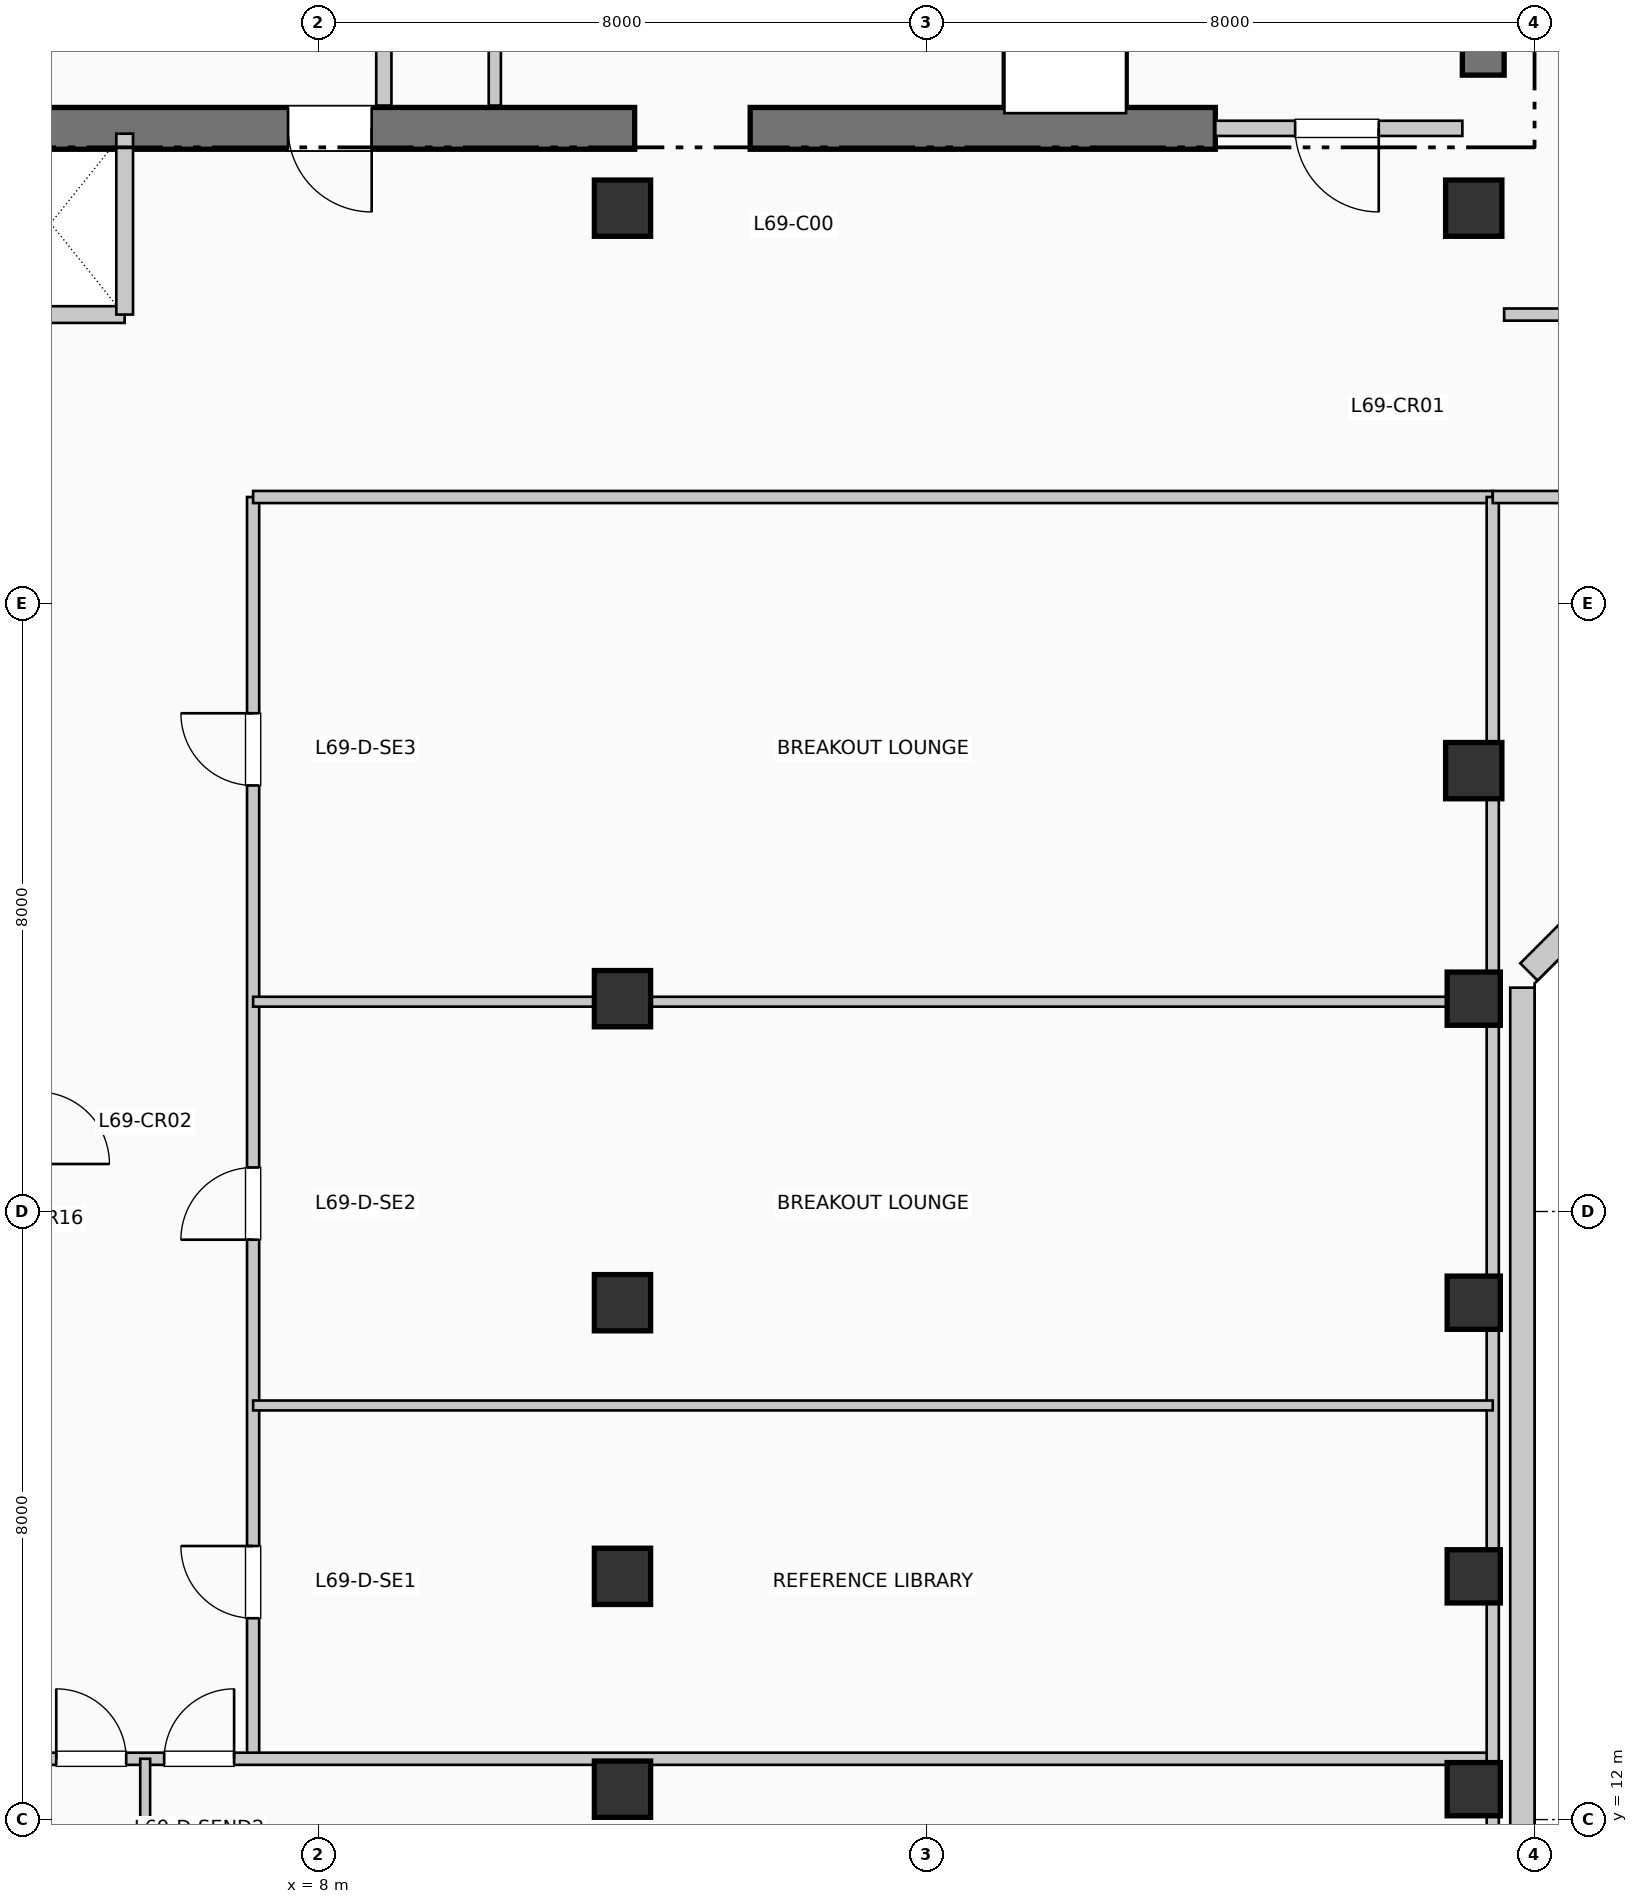
"""IFC4 building model, lengths in metres.
Left out: names, types, materials, properties, quantities, classifications, styles, units other than length and angle.
Written with IfcOpenShell. Run it as: python <this file> out.ifc"""

import sys

from ifc_helpers import new_model, si_unit, direction, frame, frame_2d, origin, origin_2d, place, context, subcontext, project, spatial, rectangle, extrude, element, fill, save


model = new_model("IFC4")
c1 = context("Model", 3, precision=1e-05, world=origin(), true_north=direction((0.0, 1.0)))
c2 = subcontext(c1, "Body", "Model", "MODEL_VIEW")
j1 = project(units=[si_unit("LENGTHUNIT", "METRE"), si_unit("PLANEANGLEUNIT", "RADIAN")], contexts=[c1])
p1 = place(None, origin())
s1 = spatial("IfcSite", under=j1, at=p1, CompositionType="ELEMENT")
p2 = place(p1, origin())
s2 = spatial("IfcBuilding", under=s1, at=p2, CompositionType="ELEMENT")
p3 = place(p2, frame((0.0, 0.0, 284.13)))
s3 = spatial("IfcBuildingStorey", under=s2, at=p3, CompositionType="ELEMENT", Elevation=284.13)
p4 = place(p3, frame((23.325, 34.95, 0.0), z_axis=(0.0, 0.0, 1.0), x_axis=(0.0, 1.0, 0.0)))
e1 = element("IfcWall", 1, at=p4, inside=s3, PredefinedType="SHEAR", context=c2, shape_type="SweptSolid", body=[
    extrude(rectangle(XDim=10.64, YDim=0.55, at=frame_2d((5.32, 0.0))), origin(), (0.0, 0.0, 1.0), 3.96),
])
p5 = place(p3, frame((1.45, 34.25, 0.0), z_axis=(0.0, 0.0, 1.0), x_axis=(1.0, 0.0, 0.0)))
e2 = element("IfcWall", 2, at=p5, inside=s3, PredefinedType="SHEAR", context=c2, shape_type="SweptSolid", body=[
    extrude(rectangle(XDim=10.71, YDim=0.55, at=frame_2d((5.355, 0.0))), origin(), (0.0, 0.0, 1.0), 3.96),
])
p6 = place(p5, frame((7.25, 0.0, 0.0), z_axis=(0.0, 0.0, 1.0), x_axis=(-1.0, 0.0, 0.0)))
e3 = element("IfcOpeningElement", 3, at=p6, cuts=e2, PredefinedType="OPENING", context=c2, shape_type="SweptSolid", body=[
    extrude(rectangle(XDim=1.1, YDim=2.15, at=frame_2d((0.55, 1.075))), frame((0.0, 0.285, 0.0), z_axis=(0.0, -1.0, 0.0), x_axis=(1.0, 0.0, 0.0)), (0.0, 0.0, 1.0), 0.57),
])
p7 = place(p3, frame((13.68, 34.25, 0.0), z_axis=(0.0, 0.0, 1.0), x_axis=(1.0, 0.0, 0.0)))
e4 = element("IfcWall", 4, at=p7, inside=s3, PredefinedType="SHEAR", context=c2, shape_type="SweptSolid", body=[
    extrude(rectangle(XDim=6.12, YDim=0.55, at=frame_2d((3.06, 0.0))), origin(), (0.0, 0.0, 1.0), 3.96),
])
for number, where, z_axis, x_axis in (
    (5, (12.0, 12.4, 0.0), (0.0, 0.0, 1.0), (1.0, 0.0, 0.0)),
    (6, (12.0, 15.2, 0.0), (0.0, 0.0, 1.0), (1.0, 0.0, 0.0)),
    (7, (12.0, 18.8, 0.0), (0.0, 0.0, 1.0), (1.0, 0.0, 0.0)),
    (8, (12.0, 22.8, 0.0), (0.0, 0.0, 1.0), (1.0, 0.0, 0.0)),
    (9, (12.0, 33.2, 0.0), (0.0, 0.0, 1.0), (1.0, 0.0, 0.0)),
):
    element("IfcColumn", number, at=place(p3, frame(where, z_axis=z_axis, x_axis=x_axis)), inside=s3, PredefinedType="COLUMN", context=c2, shape_type="SweptSolid", body=[
        extrude(rectangle(XDim=0.74, YDim=0.74, at=origin_2d()), origin(), (0.0, 0.0, 1.0), 3.96),
    ])
for number, where, z_axis, x_axis in (
    (10, (23.2, 12.4, 0.0), (0.0, 0.0, 1.0), (1.0, 0.0, 0.0)),
    (11, (23.2, 15.2, 0.0), (0.0, 0.0, 1.0), (1.0, 0.0, 0.0)),
    (12, (23.2, 18.8, 0.0), (0.0, 0.0, 1.0), (1.0, 0.0, 0.0)),
    (13, (23.2, 22.8, 0.0), (0.0, 0.0, 1.0), (1.0, 0.0, 0.0)),
):
    element("IfcColumn", number, at=place(p3, frame(where, z_axis=z_axis, x_axis=x_axis)), inside=s3, PredefinedType="COLUMN", context=c2, shape_type="SweptSolid", body=[
        extrude(rectangle(XDim=0.7, YDim=0.7, at=origin_2d()), origin(), (0.0, 0.0, 1.0), 3.96),
    ])
for number, where, z_axis, x_axis in (
    (14, (23.2, 25.8, 0.0), (0.0, 0.0, 1.0), (1.0, 0.0, 0.0)),
    (15, (23.2, 33.2, 0.0), (0.0, 0.0, 1.0), (1.0, 0.0, 0.0)),
):
    element("IfcColumn", number, at=place(p3, frame(where, z_axis=z_axis, x_axis=x_axis)), inside=s3, PredefinedType="COLUMN", context=c2, shape_type="SweptSolid", body=[
        extrude(rectangle(XDim=0.74, YDim=0.74, at=origin_2d()), origin(), (0.0, 0.0, 1.0), 3.96),
    ])
p8 = place(p3, frame((23.84, 8.855, 0.0), z_axis=(0.0, 0.0, 1.0), x_axis=(0.0, 1.0, 0.0)))
e16 = element("IfcWall", 16, at=p8, inside=s3, PredefinedType="SOLIDWALL", context=c2, shape_type="SweptSolid", body=[
    extrude(rectangle(XDim=14.09, YDim=0.32, at=frame_2d((7.045, 0.0))), origin(), (0.0, 0.0, 1.0), 3.74),
])
p9 = place(p3, frame((23.926, 23.152, 0.0), z_axis=(0.0, 0.0, 1.0), x_axis=(0.707106781187, 0.707106781187, 0.0)))
e17 = element("IfcWall", 17, at=p9, inside=s3, PredefinedType="SOLIDWALL", context=c2, shape_type="SweptSolid", body=[
    extrude(rectangle(XDim=2.718, YDim=0.32, at=frame_2d((1.359, 0.0))), origin(), (0.0, 0.0, 1.0), 3.74),
])
p10 = place(p3, frame((8.86, 34.55, 0.0), z_axis=(0.0, 0.0, 1.0), x_axis=(0.0, 1.0, 0.0)))
e18 = element("IfcWall", 18, at=p10, inside=s3, PredefinedType="PARTITIONING", context=c2, shape_type="SweptSolid", body=[
    extrude(rectangle(XDim=2.5, YDim=0.2, at=frame_2d((1.25, 0.0))), origin(), (0.0, 0.0, 1.0), 3.74),
])
p11 = place(p3, frame((19.8, 34.25, 0.0), z_axis=(0.0, 0.0, 1.0), x_axis=(1.0, 0.0, 0.0)))
e19 = element("IfcWall", 19, at=p11, inside=s3, PredefinedType="PARTITIONING", context=c2, shape_type="SweptSolid", body=[
    extrude(rectangle(XDim=3.25, YDim=0.2, at=frame_2d((1.625, 0.0))), origin(), (0.0, 0.0, 1.0), 3.74),
])
p12 = place(p11, frame((2.15, 0.0, 0.0), z_axis=(0.0, 0.0, 1.0), x_axis=(-1.0, 0.0, 0.0)))
e20 = element("IfcOpeningElement", 20, at=p12, cuts=e19, PredefinedType="OPENING", context=c2, shape_type="SweptSolid", body=[
    extrude(rectangle(XDim=1.1, YDim=2.15, at=frame_2d((0.55, 1.075))), frame((0.0, 0.11, 0.0), z_axis=(0.0, -1.0, 0.0), x_axis=(1.0, 0.0, 0.0)), (0.0, 0.0, 1.0), 0.22),
])
p13 = place(p3, frame((1.55, 31.8, 0.0), z_axis=(0.0, 0.0, 1.0), x_axis=(1.0, 0.0, 0.0)))
e21 = element("IfcWall", 21, at=p13, inside=s3, PredefinedType="PARTITIONING", context=c2, shape_type="SweptSolid", body=[
    extrude(rectangle(XDim=3.9, YDim=0.22, at=frame_2d((1.95, 0.0))), origin(), (0.0, 0.0, 1.0), 3.74),
])
p14 = place(p3, frame((5.45, 31.8, 0.0), z_axis=(0.0, 0.0, 1.0), x_axis=(0.0, 1.0, 0.0)))
e22 = element("IfcWall", 22, at=p14, inside=s3, PredefinedType="PARTITIONING", context=c2, shape_type="SweptSolid", body=[
    extrude(rectangle(XDim=2.38, YDim=0.22, at=frame_2d((1.19, 0.0))), origin(), (0.0, 0.0, 1.0), 3.74),
])
p15 = place(p3, frame((10.32, 34.55, 0.0), z_axis=(0.0, 0.0, 1.0), x_axis=(0.0, 1.0, 0.0)))
e23 = element("IfcWall", 23, at=p15, inside=s3, PredefinedType="PARTITIONING", context=c2, shape_type="SweptSolid", body=[
    extrude(rectangle(XDim=2.15, YDim=0.16, at=frame_2d((1.075, 0.0))), origin(), (0.0, 0.0, 1.0), 3.74),
])
p16 = place(p3, frame((7.14, 12.8, 0.0), z_axis=(0.0, 0.0, 1.0), x_axis=(0.0, 1.0, 0.0)))
e24 = element("IfcWall", 24, at=p16, inside=s3, PredefinedType="PARTITIONING", context=c2, shape_type="SweptSolid", body=[
    extrude(rectangle(XDim=16.6, YDim=0.16, at=frame_2d((8.3, 0.0))), origin(), (0.0, 0.0, 1.0), 3.74),
])
p17 = place(p16, frame((1.849, 0.0, 0.0)))
e25 = element("IfcOpeningElement", 25, at=p17, cuts=e24, PredefinedType="OPENING", context=c2, shape_type="SweptSolid", body=[
    extrude(rectangle(XDim=0.95, YDim=2.15, at=frame_2d((0.475, 1.075))), frame((0.0, 0.09, 0.0), z_axis=(0.0, -1.0, 0.0), x_axis=(1.0, 0.0, 0.0)), (0.0, 0.0, 1.0), 0.18),
])
p18 = place(p16, frame((6.829, 0.0, 0.0)))
e26 = element("IfcOpeningElement", 26, at=p18, cuts=e24, PredefinedType="OPENING", context=c2, shape_type="SweptSolid", body=[
    extrude(rectangle(XDim=0.95, YDim=2.15, at=frame_2d((0.475, 1.075))), frame((0.0, 0.09, 0.0), z_axis=(0.0, -1.0, 0.0), x_axis=(1.0, 0.0, 0.0)), (0.0, 0.0, 1.0), 0.18),
])
p19 = place(p16, frame((12.805, 0.0, 0.0)))
e27 = element("IfcOpeningElement", 27, at=p19, cuts=e24, PredefinedType="OPENING", context=c2, shape_type="SweptSolid", body=[
    extrude(rectangle(XDim=0.95, YDim=2.15, at=frame_2d((0.475, 1.075))), frame((0.0, 0.09, 0.0), z_axis=(0.0, -1.0, 0.0), x_axis=(1.0, 0.0, 0.0)), (0.0, 0.0, 1.0), 0.18),
])
p20 = place(p3, frame((0.19, 12.8, 0.0), z_axis=(0.0, 0.0, 1.0), x_axis=(1.0, 0.0, 0.0)))
e28 = element("IfcWall", 28, at=p20, inside=s3, PredefinedType="PARTITIONING", context=c2, shape_type="SweptSolid", body=[
    extrude(rectangle(XDim=23.26, YDim=0.16, at=frame_2d((11.63, 0.0))), origin(), (0.0, 0.0, 1.0), 3.175),
])
p21 = place(p20, frame((4.36, 0.0, 0.0)))
e29 = element("IfcOpeningElement", 29, at=p21, cuts=e28, PredefinedType="OPENING", context=c2, shape_type="SweptSolid", body=[
    extrude(rectangle(XDim=0.92, YDim=2.1, at=frame_2d((0.46, 1.05))), frame((0.0, 0.09, 0.0), z_axis=(0.0, -1.0, 0.0), x_axis=(1.0, 0.0, 0.0)), (0.0, 0.0, 1.0), 0.18),
])
p22 = place(p20, frame((5.78, 0.0, 0.0)))
e30 = element("IfcOpeningElement", 30, at=p22, cuts=e28, PredefinedType="OPENING", context=c2, shape_type="SweptSolid", body=[
    extrude(rectangle(XDim=0.92, YDim=2.1, at=frame_2d((0.46, 1.05))), frame((0.0, 0.09, 0.0), z_axis=(0.0, -1.0, 0.0), x_axis=(1.0, 0.0, 0.0)), (0.0, 0.0, 1.0), 0.18),
])
p23 = place(p3, frame((7.14, 29.4, 0.0), z_axis=(0.0, 0.0, 1.0), x_axis=(1.0, 0.0, 0.0)))
e31 = element("IfcWall", 31, at=p23, inside=s3, PredefinedType="PARTITIONING", context=c2, shape_type="SweptSolid", body=[
    extrude(rectangle(XDim=16.31, YDim=0.16, at=frame_2d((8.155, 0.0))), origin(), (0.0, 0.0, 1.0), 3.425),
])
p24 = place(p3, frame((23.45, 5.99, 0.0), z_axis=(0.0, 0.0, 1.0), x_axis=(0.0, 1.0, 0.0)))
e32 = element("IfcWall", 32, at=p24, inside=s3, PredefinedType="PARTITIONING", context=c2, shape_type="SweptSolid", body=[
    extrude(rectangle(XDim=23.41, YDim=0.16, at=frame_2d((11.705, 0.0))), origin(), (0.0, 0.0, 1.0), 3.175),
])
p25 = place(p3, frame((5.72, 5.99, 0.0), z_axis=(0.0, 0.0, 1.0), x_axis=(0.0, 1.0, 0.0)))
e33 = element("IfcWall", 33, at=p25, inside=s3, PredefinedType="PARTITIONING", context=c2, shape_type="SweptSolid", body=[
    extrude(rectangle(XDim=6.81, YDim=0.13, at=frame_2d((3.405, 0.0))), origin(), (0.0, 0.0, 1.0), 3.74),
])
p26 = place(p3, frame((7.14, 17.448, 0.0), z_axis=(0.0, 0.0, 1.0), x_axis=(1.0, 0.0, 0.0)))
e34 = element("IfcWall", 34, at=p26, inside=s3, PredefinedType="PARTITIONING", context=c2, shape_type="SweptSolid", body=[
    extrude(rectangle(XDim=16.31, YDim=0.13, at=frame_2d((8.155, 0.0))), origin(), (0.0, 0.0, 1.0), 3.74),
])
p27 = place(p3, frame((7.14, 22.76, 0.0), z_axis=(0.0, 0.0, 1.0), x_axis=(1.0, 0.0, 0.0)))
e35 = element("IfcWall", 35, at=p27, inside=s3, PredefinedType="PARTITIONING", context=c2, shape_type="SweptSolid", body=[
    extrude(rectangle(XDim=16.31, YDim=0.13, at=frame_2d((8.155, 0.0))), origin(), (0.0, 0.0, 1.0), 3.175),
])
p28 = place(p3, frame((23.45, 29.4, 0.0), z_axis=(0.0, 0.0, 1.0), x_axis=(1.0, 0.0, 0.0)))
e36 = element("IfcWall", 36, at=p28, inside=s3, PredefinedType="PARTITIONING", context=c2, shape_type="SweptSolid", body=[
    extrude(rectangle(XDim=20.76, YDim=0.16, at=frame_2d((10.38, 0.0))), origin(), (0.0, 0.0, 1.0), 3.425),
])
p29 = place(p28, frame((2.966, 0.0, 0.0), z_axis=(0.0, 0.0, 1.0), x_axis=(-1.0, 0.0, 0.0)))
e37 = element("IfcOpeningElement", 37, at=p29, cuts=e36, PredefinedType="OPENING", context=c2, shape_type="SweptSolid", body=[
    extrude(rectangle(XDim=0.95, YDim=2.15, at=frame_2d((0.475, 1.075))), frame((0.0, 0.09, 0.0), z_axis=(0.0, -1.0, 0.0), x_axis=(1.0, 0.0, 0.0)), (0.0, 0.0, 1.0), 0.18),
])
p30 = place(p28, frame((8.364, 0.0, 0.0), z_axis=(0.0, 0.0, 1.0), x_axis=(-1.0, 0.0, 0.0)))
e38 = element("IfcOpeningElement", 38, at=p30, cuts=e36, PredefinedType="OPENING", context=c2, shape_type="SweptSolid", body=[
    extrude(rectangle(XDim=0.95, YDim=2.15, at=frame_2d((0.475, 1.075))), frame((0.0, 0.09, 0.0), z_axis=(0.0, -1.0, 0.0), x_axis=(1.0, 0.0, 0.0)), (0.0, 0.0, 1.0), 0.18),
])
p31 = place(p28, frame((14.177, 0.0, 0.0), z_axis=(0.0, 0.0, 1.0), x_axis=(-1.0, 0.0, 0.0)))
e39 = element("IfcOpeningElement", 39, at=p31, cuts=e36, PredefinedType="OPENING", context=c2, shape_type="SweptSolid", body=[
    extrude(rectangle(XDim=0.95, YDim=2.15, at=frame_2d((0.475, 1.075))), frame((0.0, 0.09, 0.0), z_axis=(0.0, -1.0, 0.0), x_axis=(1.0, 0.0, 0.0)), (0.0, 0.0, 1.0), 0.18),
])
p32 = place(p28, frame((19.159, 0.0, 0.0), z_axis=(0.0, 0.0, 1.0), x_axis=(-1.0, 0.0, 0.0)))
e40 = element("IfcOpeningElement", 40, at=p32, cuts=e36, PredefinedType="OPENING", context=c2, shape_type="SweptSolid", body=[
    extrude(rectangle(XDim=0.95, YDim=2.15, at=frame_2d((0.475, 1.075))), frame((0.0, 0.09, 0.0), z_axis=(0.0, -1.0, 0.0), x_axis=(1.0, 0.0, 0.0)), (0.0, 0.0, 1.0), 0.18),
])
p33 = place(p3, frame((23.6, 31.8, 0.0), z_axis=(0.0, 0.0, 1.0), x_axis=(1.0, 0.0, 0.0)))
e41 = element("IfcWall", 41, at=p33, inside=s3, PredefinedType="PARTITIONING", context=c2, shape_type="SweptSolid", body=[
    extrude(rectangle(XDim=20.61, YDim=0.16, at=frame_2d((10.305, 0.0))), origin(), (0.0, 0.0, 1.0), 3.74),
])
p34 = place(p33, frame((4.677, 0.0, 0.0)))
e42 = element("IfcOpeningElement", 42, at=p34, cuts=e41, PredefinedType="OPENING", context=c2, shape_type="SweptSolid", body=[
    extrude(rectangle(XDim=0.95, YDim=2.15, at=frame_2d((0.475, 1.075))), frame((0.0, 0.09, 0.0), z_axis=(0.0, -1.0, 0.0), x_axis=(1.0, 0.0, 0.0)), (0.0, 0.0, 1.0), 0.18),
])
p35 = place(p33, frame((14.982, 0.0, 0.0)))
e43 = element("IfcOpeningElement", 43, at=p35, cuts=e41, PredefinedType="OPENING", context=c2, shape_type="SweptSolid", body=[
    extrude(rectangle(XDim=0.95, YDim=2.15, at=frame_2d((0.475, 1.075))), frame((0.0, 0.09, 0.0), z_axis=(0.0, -1.0, 0.0), x_axis=(1.0, 0.0, 0.0)), (0.0, 0.0, 1.0), 0.18),
])
p36 = place(p6, origin())
e44 = element("IfcDoor", 44, at=p36, inside=s3, OperationType="SINGLE_SWING_RIGHT", PredefinedType="DOOR", context=c2, shape_type="SweptSolid", body=[
    extrude(rectangle(XDim=1.1, YDim=2.15, at=frame_2d((0.55, 1.075))), frame((0.0, 0.025, 0.0), z_axis=(0.0, -1.0, 0.0), x_axis=(1.0, 0.0, 0.0)), (0.0, 0.0, 1.0), 0.05),
])
fill(e3, e44)
p37 = place(p12, origin())
e45 = element("IfcDoor", 45, at=p37, inside=s3, OperationType="SINGLE_SWING_RIGHT", PredefinedType="DOOR", context=c2, shape_type="SweptSolid", body=[
    extrude(rectangle(XDim=1.1, YDim=2.15, at=frame_2d((0.55, 1.075))), frame((0.0, 0.025, 0.0), z_axis=(0.0, -1.0, 0.0), x_axis=(1.0, 0.0, 0.0)), (0.0, 0.0, 1.0), 0.05),
])
fill(e20, e45)
p38 = place(p21, origin())
e46 = element("IfcDoor", 46, at=p38, inside=s3, OperationType="SINGLE_SWING_LEFT", PredefinedType="DOOR", context=c2, shape_type="SweptSolid", body=[
    extrude(rectangle(XDim=0.92, YDim=2.1, at=frame_2d((0.46, 1.05))), frame((0.0, 0.025, 0.0), z_axis=(0.0, -1.0, 0.0), x_axis=(1.0, 0.0, 0.0)), (0.0, 0.0, 1.0), 0.05),
])
fill(e29, e46)
p39 = place(p22, origin())
e47 = element("IfcDoor", 47, at=p39, inside=s3, OperationType="SINGLE_SWING_RIGHT", PredefinedType="DOOR", context=c2, shape_type="SweptSolid", body=[
    extrude(rectangle(XDim=0.92, YDim=2.1, at=frame_2d((0.46, 1.05))), frame((0.0, 0.025, 0.0), z_axis=(0.0, -1.0, 0.0), x_axis=(1.0, 0.0, 0.0)), (0.0, 0.0, 1.0), 0.05),
])
fill(e30, e47)
p40 = place(p17, origin())
e48 = element("IfcDoor", 48, at=p40, inside=s3, OperationType="SINGLE_SWING_RIGHT", PredefinedType="DOOR", context=c2, shape_type="SweptSolid", body=[
    extrude(rectangle(XDim=0.95, YDim=2.15, at=frame_2d((0.475, 1.075))), frame((0.0, 0.025, 0.0), z_axis=(0.0, -1.0, 0.0), x_axis=(1.0, 0.0, 0.0)), (0.0, 0.0, 1.0), 0.05),
])
fill(e25, e48)
p41 = place(p18, origin())
e49 = element("IfcDoor", 49, at=p41, inside=s3, OperationType="SINGLE_SWING_LEFT", PredefinedType="DOOR", context=c2, shape_type="SweptSolid", body=[
    extrude(rectangle(XDim=0.95, YDim=2.15, at=frame_2d((0.475, 1.075))), frame((0.0, 0.025, 0.0), z_axis=(0.0, -1.0, 0.0), x_axis=(1.0, 0.0, 0.0)), (0.0, 0.0, 1.0), 0.05),
])
fill(e26, e49)
p42 = place(p19, origin())
e50 = element("IfcDoor", 50, at=p42, inside=s3, OperationType="SINGLE_SWING_RIGHT", PredefinedType="DOOR", context=c2, shape_type="SweptSolid", body=[
    extrude(rectangle(XDim=0.95, YDim=2.15, at=frame_2d((0.475, 1.075))), frame((0.0, 0.025, 0.0), z_axis=(0.0, -1.0, 0.0), x_axis=(1.0, 0.0, 0.0)), (0.0, 0.0, 1.0), 0.05),
])
fill(e27, e50)
save(model, sys.argv[1])
